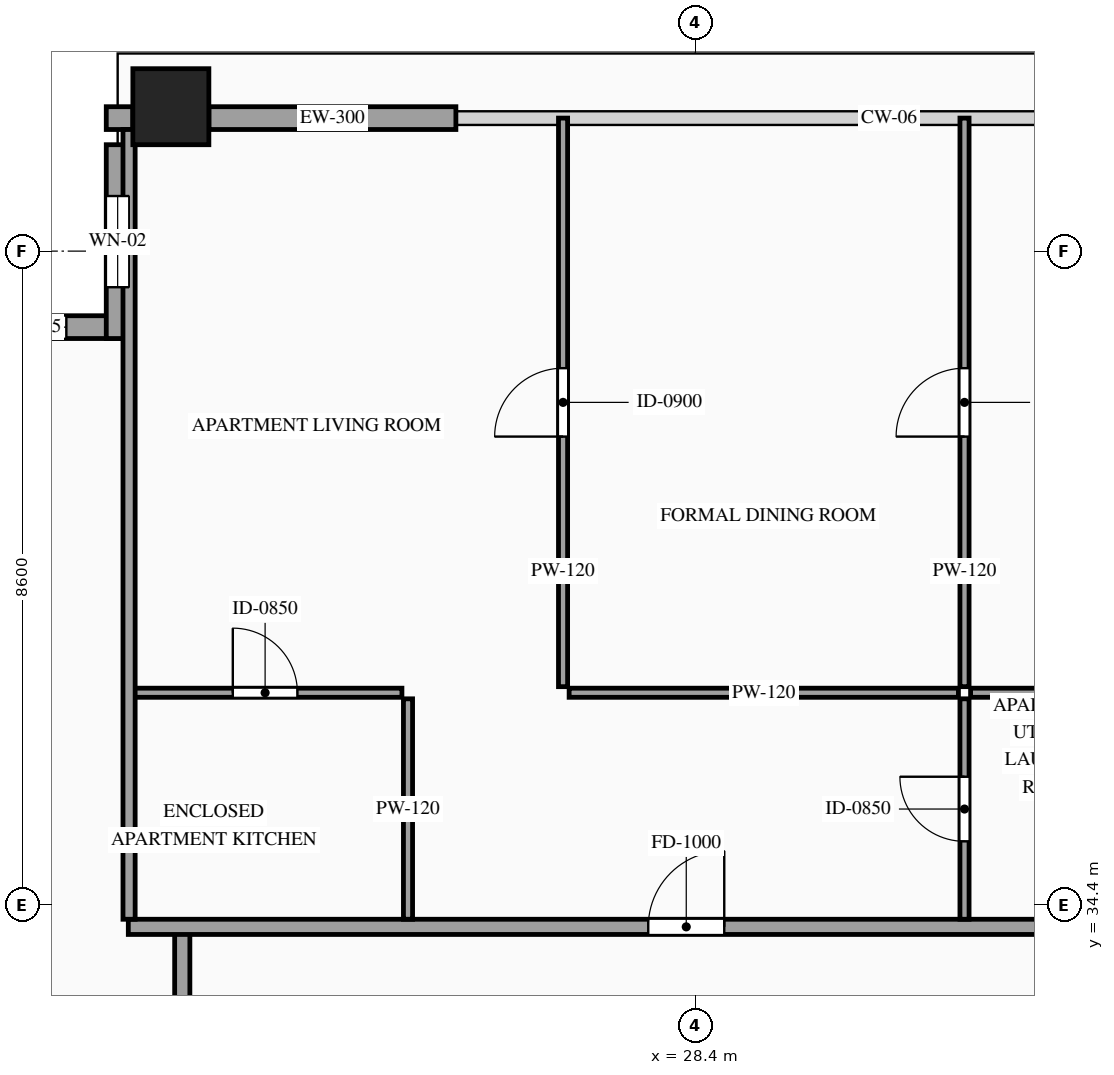
"""IFC4 building model, lengths in metres.
Left out: names, types, materials, properties, quantities, classifications, styles, units other than length and angle.
Written with IfcOpenShell. Run it as: python <this file> out.ifc"""

import sys

from ifc_helpers import new_model, si_unit, direction, frame, frame_2d, origin, origin_2d, place, context, subcontext, project, spatial, rectangle, hollow_rectangle, extrude, source, transform, mapped, element, fill, save


model = new_model("IFC4")
c1 = context("Model", 3, precision=1e-05, world=origin(), true_north=direction((0.0, 1.0)))
c2 = subcontext(c1, "Body", "Model", "MODEL_VIEW")
j1 = project(units=[si_unit("LENGTHUNIT", "METRE"), si_unit("PLANEANGLEUNIT", "RADIAN")], contexts=[c1])
p1 = place(None, origin())
s1 = spatial("IfcSite", under=j1, at=p1, CompositionType="ELEMENT")
p2 = place(p1, origin())
s2 = spatial("IfcBuilding", under=s1, at=p2, CompositionType="ELEMENT")
p3 = place(p2, frame((0.0, 0.0, 318.2)))
s3 = spatial("IfcBuildingStorey", under=s2, at=p3, CompositionType="ELEMENT", Elevation=318.2)
m1 = source(origin(), c2, "Body", "SweptSolid", [
    extrude(hollow_rectangle(XDim=1.0, YDim=1.0, WallThickness=0.048, at=origin_2d()), origin(), (0.0, 0.0, 1.0), 3.5),
])
p4 = place(p3, frame((21.5, 44.9, 0.0), z_axis=(0.0, 0.0, 1.0), x_axis=(1.0, 0.0, 0.0)))
e1 = element("IfcColumn", 1, at=p4, inside=s3, PredefinedType="COLUMN", context=c2, shape_type="MappedRepresentation", body=[
    mapped(m1, transform((0.0, 0.0, 0.0), scale=1.0)),
])
p5 = place(p3, frame((20.95, 42.0, 0.0), z_axis=(0.0, 0.0, 1.0), x_axis=(-1.0, 0.0, 0.0)))
e2 = element("IfcWall", 2, at=p5, inside=s3, PredefinedType="SOLIDWALL", context=c2, shape_type="SweptSolid", body=[
    extrude(rectangle(XDim=2.55, YDim=0.3, at=frame_2d((1.275, 0.0))), origin(), (0.0, 0.0, 1.0), 3.28),
])
p6 = place(p5, frame((0.825, 0.0, 0.85)))
e3 = element("IfcOpeningElement", 3, at=p6, cuts=e2, PredefinedType="OPENING", context=c2, shape_type="SweptSolid", body=[
    extrude(rectangle(XDim=0.9, YDim=1.5, at=frame_2d((0.45, 0.75))), frame((0.0, 0.165, 0.0), z_axis=(0.0, -1.0, 0.0), x_axis=(1.0, 0.0, 0.0)), (0.0, 0.0, 1.0), 0.33),
])
p7 = place(p3, frame((20.8, 44.4, 0.0), z_axis=(0.0, 0.0, 1.0), x_axis=(0.0, -1.0, 0.0)))
e4 = element("IfcWall", 4, at=p7, inside=s3, PredefinedType="SOLIDWALL", context=c2, shape_type="SweptSolid", body=[
    extrude(rectangle(XDim=2.55, YDim=0.3, at=frame_2d((1.275, 0.0))), origin(), (0.0, 0.0, 1.0), 3.28),
])
p8 = place(p7, frame((0.675, 0.0, 0.85)))
e5 = element("IfcOpeningElement", 5, at=p8, cuts=e4, PredefinedType="OPENING", context=c2, shape_type="SweptSolid", body=[
    extrude(rectangle(XDim=1.2, YDim=2.1, at=frame_2d((0.6, 1.05))), frame((0.0, 0.165, 0.0), z_axis=(0.0, -1.0, 0.0), x_axis=(1.0, 0.0, 0.0)), (0.0, 0.0, 1.0), 0.33),
])
m2 = source(origin(), c2, "Body", "SweptSolid", [
    extrude(rectangle(XDim=0.35, YDim=0.3, at=frame_2d((0.175, 0.0))), origin(), (0.0, 0.0, 1.0), 3.28),
])
p9 = place(p3, frame((20.65, 44.75, 0.0), z_axis=(0.0, 0.0, 1.0), x_axis=(1.0, 0.0, 0.0)))
e6 = element("IfcWall", 6, at=p9, inside=s3, PredefinedType="SOLIDWALL", context=c2, shape_type="MappedRepresentation", body=[
    mapped(m2, transform((0.0, 0.0, 0.0), scale=1.0)),
])
m3 = source(origin(), c2, "Body", "SweptSolid", [
    extrude(rectangle(XDim=3.25, YDim=0.3, at=frame_2d((1.625, 0.0))), origin(), (0.0, 0.0, 1.0), 2.885),
])
p10 = place(p3, frame((22.0, 44.75, 0.0), z_axis=(0.0, 0.0, 1.0), x_axis=(1.0, 0.0, 0.0)))
e7 = element("IfcWall", 7, at=p10, inside=s3, PredefinedType="SOLIDWALL", context=c2, shape_type="MappedRepresentation", body=[
    mapped(m3, transform((0.0, 0.0, 0.0), scale=1.0)),
])
m4 = source(origin(), c2, "Body", "SweptSolid", [
    extrude(rectangle(XDim=1.7, YDim=0.2, at=frame_2d((0.85, 0.0))), origin(), (0.0, 0.0, 1.0), 3.28),
])
p11 = place(p3, frame((21.65, 32.35, 0.0), z_axis=(0.0, 0.0, 1.0), x_axis=(0.0, 1.0, 0.0)))
e8 = element("IfcWall", 8, at=p11, inside=s3, PredefinedType="PARTITIONING", context=c2, shape_type="MappedRepresentation", body=[
    mapped(m4, transform((0.0, 0.0, 0.0), scale=1.0)),
])
p12 = place(p3, frame((20.94, 34.11, 0.0), z_axis=(0.0, 0.0, 1.0), x_axis=(1.0, 0.0, 0.0)))
e9 = element("IfcWall", 9, at=p12, inside=s3, PredefinedType="PARTITIONING", context=c2, shape_type="SweptSolid", body=[
    extrude(rectangle(XDim=15.98, YDim=0.2, at=frame_2d((7.99, 0.0))), origin(), (0.0, 0.0, 1.0), 3.28),
])
p13 = place(p12, frame((6.841, 0.0, 0.0)))
e10 = element("IfcOpeningElement", 10, at=p13, cuts=e9, PredefinedType="OPENING", context=c2, shape_type="SweptSolid", body=[
    extrude(rectangle(XDim=1.0, YDim=2.2, at=frame_2d((0.5, 1.1))), frame((0.0, 0.115, 0.0), z_axis=(0.0, -1.0, 0.0), x_axis=(1.0, 0.0, 0.0)), (0.0, 0.0, 1.0), 0.23),
])
p14 = place(p3, frame((20.94, 37.19, 0.0), z_axis=(0.0, 0.0, 1.0), x_axis=(1.0, 0.0, 0.0)))
e11 = element("IfcWall", 11, at=p14, inside=s3, PredefinedType="PARTITIONING", context=c2, shape_type="SweptSolid", body=[
    extrude(rectangle(XDim=3.6, YDim=0.12, at=frame_2d((1.8, 0.0))), origin(), (0.0, 0.0, 1.0), 3.28),
])
p15 = place(p14, frame((1.375, 0.0, 0.0)))
e12 = element("IfcOpeningElement", 12, at=p15, cuts=e11, PredefinedType="OPENING", context=c2, shape_type="SweptSolid", body=[
    extrude(rectangle(XDim=0.85, YDim=2.1, at=frame_2d((0.425, 1.05))), frame((0.0, 0.075, 0.0), z_axis=(0.0, -1.0, 0.0), x_axis=(1.0, 0.0, 0.0)), (0.0, 0.0, 1.0), 0.15),
])
m5 = source(origin(), c2, "Body", "SweptSolid", [
    extrude(rectangle(XDim=2.9, YDim=0.12, at=frame_2d((1.45, 0.0))), origin(), (0.0, 0.0, 1.0), 3.28),
])
p16 = place(p3, frame((24.62, 34.21, 0.0), z_axis=(0.0, 0.0, 1.0), x_axis=(0.0, 1.0, 0.0)))
e13 = element("IfcWall", 13, at=p16, inside=s3, PredefinedType="PARTITIONING", context=c2, shape_type="MappedRepresentation", body=[
    mapped(m5, transform((0.0, 0.0, 0.0), scale=1.0)),
])
m6 = source(origin(), c2, "Body", "SweptSolid", [
    extrude(rectangle(XDim=4.898, YDim=0.12, at=frame_2d((2.449, 0.0))), origin(), (0.0, 0.0, 1.0), 3.28),
])
p17 = place(p3, frame((32.022, 37.19, 0.0), z_axis=(0.0, 0.0, 1.0), x_axis=(1.0, 0.0, 0.0)))
e14 = element("IfcWall", 14, at=p17, inside=s3, PredefinedType="PARTITIONING", context=c2, shape_type="MappedRepresentation", body=[
    mapped(m6, transform((0.0, 0.0, 0.0), scale=1.0)),
])
p18 = place(p3, frame((31.942, 37.27, 0.0), z_axis=(0.0, 0.0, 1.0), x_axis=(0.0, 1.0, 0.0)))
e15 = element("IfcWall", 15, at=p18, inside=s3, PredefinedType="PARTITIONING", context=c2, shape_type="SweptSolid", body=[
    extrude(rectangle(XDim=7.48, YDim=0.12, at=frame_2d((3.74, 0.0))), origin(), (0.0, 0.0, 1.0), 3.28),
])
p19 = place(p18, frame((3.29, 0.0, 0.0)))
e16 = element("IfcOpeningElement", 16, at=p19, cuts=e15, PredefinedType="OPENING", context=c2, shape_type="SweptSolid", body=[
    extrude(rectangle(XDim=0.9, YDim=2.15, at=frame_2d((0.45, 1.075))), frame((0.0, 0.075, 0.0), z_axis=(0.0, -1.0, 0.0), x_axis=(1.0, 0.0, 0.0)), (0.0, 0.0, 1.0), 0.15),
])
p20 = place(p3, frame((31.942, 34.21, 0.0), z_axis=(0.0, 0.0, 1.0), x_axis=(0.0, 1.0, 0.0)))
e17 = element("IfcWall", 17, at=p20, inside=s3, PredefinedType="PARTITIONING", context=c2, shape_type="SweptSolid", body=[
    extrude(rectangle(XDim=2.9, YDim=0.12, at=frame_2d((1.45, 0.0))), origin(), (0.0, 0.0, 1.0), 3.28),
])
p21 = place(p20, frame((1.025, 0.0, 0.0)))
e18 = element("IfcOpeningElement", 18, at=p21, cuts=e17, PredefinedType="OPENING", context=c2, shape_type="SweptSolid", body=[
    extrude(rectangle(XDim=0.85, YDim=2.1, at=frame_2d((0.425, 1.05))), frame((0.0, 0.075, 0.0), z_axis=(0.0, -1.0, 0.0), x_axis=(1.0, 0.0, 0.0)), (0.0, 0.0, 1.0), 0.15),
])
m7 = source(origin(), c2, "Body", "SweptSolid", [
    extrude(rectangle(XDim=5.122, YDim=0.12, at=frame_2d((2.561, 0.0))), origin(), (0.0, 0.0, 1.0), 3.28),
])
p22 = place(p3, frame((26.74, 37.19, 0.0), z_axis=(0.0, 0.0, 1.0), x_axis=(1.0, 0.0, 0.0)))
e19 = element("IfcWall", 19, at=p22, inside=s3, PredefinedType="PARTITIONING", context=c2, shape_type="MappedRepresentation", body=[
    mapped(m7, transform((0.0, 0.0, 0.0), scale=1.0)),
])
p23 = place(p3, frame((26.66, 37.27, 0.0), z_axis=(0.0, 0.0, 1.0), x_axis=(0.0, 1.0, 0.0)))
e20 = element("IfcWall", 20, at=p23, inside=s3, PredefinedType="PARTITIONING", context=c2, shape_type="SweptSolid", body=[
    extrude(rectangle(XDim=7.48, YDim=0.12, at=frame_2d((3.74, 0.0))), origin(), (0.0, 0.0, 1.0), 3.28),
])
p24 = place(p23, frame((3.29, 0.0, 0.0)))
e21 = element("IfcOpeningElement", 21, at=p24, cuts=e20, PredefinedType="OPENING", context=c2, shape_type="SweptSolid", body=[
    extrude(rectangle(XDim=0.9, YDim=2.15, at=frame_2d((0.45, 1.075))), frame((0.0, 0.075, 0.0), z_axis=(0.0, -1.0, 0.0), x_axis=(1.0, 0.0, 0.0)), (0.0, 0.0, 1.0), 0.15),
])
m8 = source(origin(), c2, "Body", "SweptSolid", [
    extrude(rectangle(XDim=10.39, YDim=0.16, at=frame_2d((5.195, 0.0))), origin(), (0.0, 0.0, 1.0), 3.28),
])
p25 = place(p3, frame((20.95, 34.21, 0.0), z_axis=(0.0, 0.0, 1.0), x_axis=(0.0, 1.0, 0.0)))
e22 = element("IfcWall", 22, at=p25, inside=s3, PredefinedType="PARTITIONING", context=c2, shape_type="MappedRepresentation", body=[
    mapped(m8, transform((0.0, 0.0, 0.0), scale=1.0)),
])
m9 = source(origin(), c2, "Body", "SweptSolid", [
    extrude(rectangle(XDim=0.9, YDim=1.5, at=frame_2d((0.45, 0.75))), frame((0.0, 0.03, 0.0), z_axis=(0.0, -1.0, 0.0), x_axis=(1.0, 0.0, 0.0)), (0.0, 0.0, 1.0), 0.06),
])
p26 = place(p6, origin())
e23 = element("IfcWindow", 23, at=p26, inside=s3, PartitioningType="SINGLE_PANEL", PredefinedType="WINDOW", context=c2, shape_type="MappedRepresentation", body=[
    mapped(m9, transform((0.0, 0.0, 0.0), scale=1.0)),
])
fill(e3, e23)
m10 = source(origin(), c2, "Body", "SweptSolid", [
    extrude(rectangle(XDim=1.2, YDim=2.1, at=frame_2d((0.6, 1.05))), frame((0.0, 0.03, 0.0), z_axis=(0.0, -1.0, 0.0), x_axis=(1.0, 0.0, 0.0)), (0.0, 0.0, 1.0), 0.06),
])
p27 = place(p8, origin())
e24 = element("IfcWindow", 24, at=p27, inside=s3, PartitioningType="SINGLE_PANEL", PredefinedType="WINDOW", context=c2, shape_type="MappedRepresentation", body=[
    mapped(m10, transform((0.0, 0.0, 0.0), scale=1.0)),
])
fill(e5, e24)
m11 = source(origin(), c2, "Body", "SweptSolid", [
    extrude(rectangle(XDim=1.0, YDim=2.2, at=frame_2d((0.5, 1.1))), frame((0.0, 0.025, 0.0), z_axis=(0.0, -1.0, 0.0), x_axis=(1.0, 0.0, 0.0)), (0.0, 0.0, 1.0), 0.05),
])
p28 = place(p13, origin())
e25 = element("IfcDoor", 25, at=p28, inside=s3, OperationType="SINGLE_SWING_RIGHT", PredefinedType="DOOR", context=c2, shape_type="MappedRepresentation", body=[
    mapped(m11, transform((0.0, 0.0, 0.0), scale=1.0)),
])
fill(e10, e25)
m12 = source(origin(), c2, "Body", "SweptSolid", [
    extrude(rectangle(XDim=0.85, YDim=2.1, at=frame_2d((0.425, 1.05))), frame((0.0, 0.025, 0.0), z_axis=(0.0, -1.0, 0.0), x_axis=(1.0, 0.0, 0.0)), (0.0, 0.0, 1.0), 0.05),
])
p29 = place(p15, origin())
e26 = element("IfcDoor", 26, at=p29, inside=s3, OperationType="SINGLE_SWING_LEFT", PredefinedType="DOOR", context=c2, shape_type="MappedRepresentation", body=[
    mapped(m12, transform((0.0, 0.0, 0.0), scale=1.0)),
])
fill(e12, e26)
m13 = source(origin(), c2, "Body", "SweptSolid", [
    extrude(rectangle(XDim=0.9, YDim=2.15, at=frame_2d((0.45, 1.075))), frame((0.0, 0.025, 0.0), z_axis=(0.0, -1.0, 0.0), x_axis=(1.0, 0.0, 0.0)), (0.0, 0.0, 1.0), 0.05),
])
p30 = place(p19, origin())
e27 = element("IfcDoor", 27, at=p30, inside=s3, OperationType="SINGLE_SWING_LEFT", PredefinedType="DOOR", context=c2, shape_type="MappedRepresentation", body=[
    mapped(m13, transform((0.0, 0.0, 0.0), scale=1.0)),
])
fill(e16, e27)
p31 = place(p21, origin())
e28 = element("IfcDoor", 28, at=p31, inside=s3, OperationType="SINGLE_SWING_RIGHT", PredefinedType="DOOR", context=c2, shape_type="MappedRepresentation", body=[
    mapped(m12, transform((0.0, 0.0, 0.0), scale=1.0)),
])
fill(e18, e28)
p32 = place(p24, origin())
e29 = element("IfcDoor", 29, at=p32, inside=s3, OperationType="SINGLE_SWING_LEFT", PredefinedType="DOOR", context=c2, shape_type="MappedRepresentation", body=[
    mapped(m13, transform((0.0, 0.0, 0.0), scale=1.0)),
])
fill(e21, e29)
save(model, sys.argv[1])
